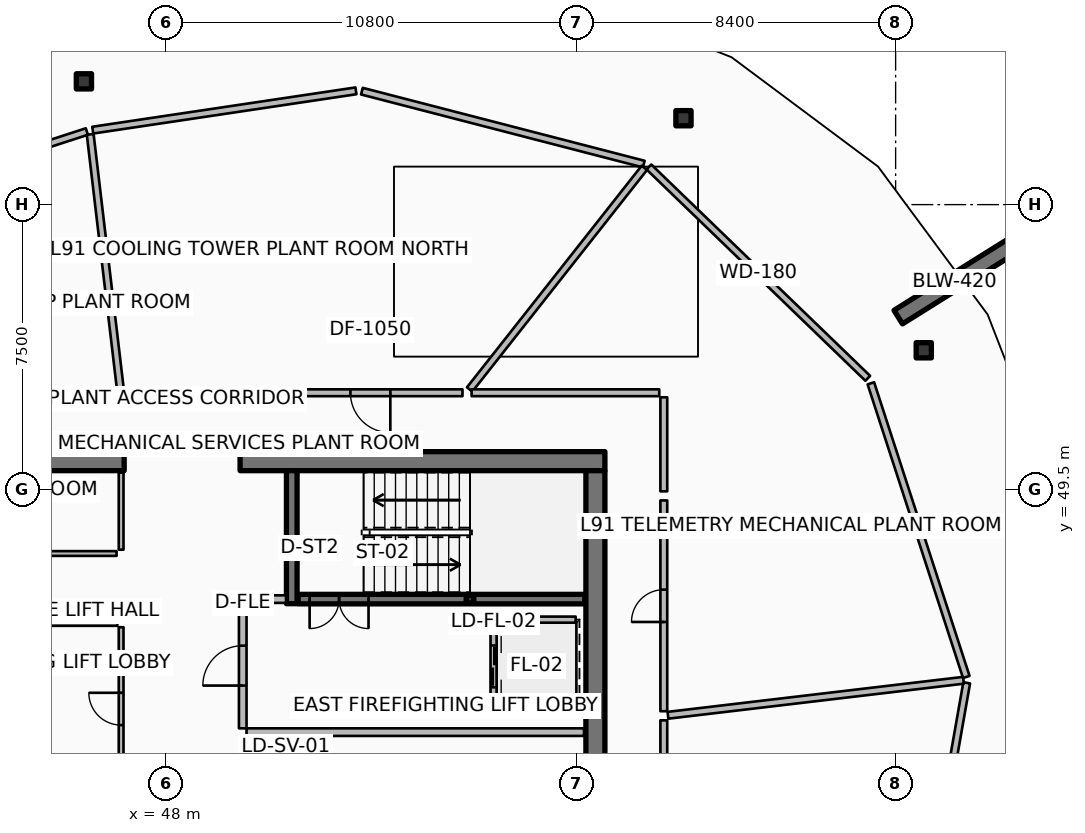
"""IFC4 building model, lengths in metres.
Left out: names, types, materials, properties, quantities, classifications, styles, units other than length and angle.
Written with IfcOpenShell. Run it as: python <this file> out.ifc"""

import sys

from ifc_helpers import new_model, si_unit, direction, frame, frame_2d, origin, origin_2d, place, context, subcontext, project, spatial, rectangle, hollow_rectangle, extrude, element, fill, save


model = new_model("IFC4")
c1 = context("Model", 3, precision=1e-05, world=origin(), true_north=direction((0.0, 1.0)))
c2 = subcontext(c1, "Body", "Model", "MODEL_VIEW")
j1 = project(units=[si_unit("LENGTHUNIT", "METRE"), si_unit("PLANEANGLEUNIT", "RADIAN")], contexts=[c1])
p1 = place(None, origin())
s1 = spatial("IfcSite", under=j1, at=p1, CompositionType="ELEMENT")
p2 = place(p1, origin())
s2 = spatial("IfcBuilding", under=s1, at=p2, CompositionType="ELEMENT")
p3 = place(p2, frame((0.0, 0.0, 363.2)))
s3 = spatial("IfcBuildingStorey", under=s2, at=p3, CompositionType="ELEMENT", Elevation=363.2)
p4 = place(p3, frame((37.3, 50.25, 0.0), z_axis=(0.0, 0.0, 1.0), x_axis=(1.0, 0.0, 0.0)))
e1 = element("IfcWall", 1, at=p4, inside=s3, PredefinedType="SHEAR", context=c2, shape_type="SweptSolid", body=[
    extrude(rectangle(XDim=9.6, YDim=0.5, at=frame_2d((4.8, 0.0))), origin(), (0.0, 0.0, 1.0), 3.6),
])
p5 = place(p3, frame((49.95, 50.25, 0.0), z_axis=(0.0, 0.0, 1.0), x_axis=(1.0, 0.0, 0.0)))
e2 = element("IfcWall", 2, at=p5, inside=s3, PredefinedType="SHEAR", context=c2, shape_type="SweptSolid", body=[
    extrude(rectangle(XDim=9.6, YDim=0.5, at=frame_2d((4.8, 0.0))), origin(), (0.0, 0.0, 1.0), 3.6),
])
p6 = place(p3, frame((59.3, 34.0, 0.0), z_axis=(0.0, 0.0, 1.0), x_axis=(0.0, 1.0, 0.0)))
e3 = element("IfcWall", 3, at=p6, inside=s3, PredefinedType="SHEAR", context=c2, shape_type="SweptSolid", body=[
    extrude(rectangle(XDim=16.0, YDim=0.5, at=frame_2d((8.0, 0.0))), origin(), (0.0, 0.0, 1.0), 3.6),
])
p7 = place(p3, frame((51.31, 46.5, 0.0), z_axis=(0.0, 0.0, 1.0), x_axis=(0.0, 1.0, 0.0)))
e4 = element("IfcWall", 4, at=p7, inside=s3, PredefinedType="SHEAR", context=c2, shape_type="SweptSolid", body=[
    extrude(rectangle(XDim=3.5, YDim=0.28, at=frame_2d((1.75, 0.0))), origin(), (0.0, 0.0, 1.0), 3.6),
])
p8 = place(p3, frame((56.0, 46.62, 0.0), z_axis=(0.0, 0.0, 1.0), x_axis=(1.0, 0.0, 0.0)))
e5 = element("IfcColumn", 5, at=p8, inside=s3, PredefinedType="COLUMN", context=c2, shape_type="SweptSolid", body=[
    extrude(hollow_rectangle(XDim=0.2, YDim=0.2, WallThickness=0.01, InnerFilletRadius=0.01, OuterFilletRadius=0.02, at=origin_2d()), origin(), (0.0, 0.0, 1.0), 1.595),
])
p9 = place(p3, frame((67.269, 54.041, 0.0), z_axis=(0.0, 0.0, 1.0), x_axis=(0.848033572426, 0.529942506352, 0.0)))
e6 = element("IfcWall", 6, at=p9, inside=s3, PredefinedType="SOLIDWALL", context=c2, shape_type="SweptSolid", body=[
    extrude(rectangle(XDim=3.5, YDim=0.42, at=frame_2d((1.75, 0.0))), origin(), (0.0, 0.0, 1.0), 3.6),
])
for number, where, z_axis, x_axis in (
    (7, (67.941, 53.167, 0.0), (0.0, 0.0, 1.0), (1.0, 0.0, 0.0)),
    (8, (61.617, 59.274, 0.0), (0.0, 0.0, 1.0), (1.0, 0.0, 0.0)),
    (9, (45.841, 60.244, 0.0), (0.0, 0.0, 1.0), (1.0, 0.0, 0.0)),
):
    element("IfcColumn", number, at=place(p3, frame(where, z_axis=z_axis, x_axis=x_axis)), inside=s3, PredefinedType="COLUMN", context=c2, shape_type="SweptSolid", body=[
        extrude(hollow_rectangle(XDim=0.4, YDim=0.4, WallThickness=0.02, InnerFilletRadius=0.02, OuterFilletRadius=0.04, at=origin_2d()), origin(), (0.0, 0.0, 1.0), 3.32),
    ])
p10 = place(p3, frame((51.48, 46.62, 0.0), z_axis=(0.0, 0.0, 1.0), x_axis=(1.0, 0.0, 0.0)))
e10 = element("IfcWall", 10, at=p10, inside=s3, PredefinedType="SOLIDWALL", context=c2, shape_type="SweptSolid", body=[
    extrude(rectangle(XDim=7.54, YDim=0.25, at=frame_2d((3.77, 0.0))), origin(), (0.0, 0.0, 1.0), 3.32),
])
p11 = place(p10, frame((0.3, 0.0, 0.0)))
e11 = element("IfcOpeningElement", 11, at=p11, cuts=e10, PredefinedType="OPENING", context=c2, shape_type="SweptSolid", body=[
    extrude(rectangle(XDim=1.55, YDim=2.15, at=frame_2d((0.775, 1.075))), frame((0.0, 0.135, 0.0), z_axis=(0.0, -1.0, 0.0), x_axis=(1.0, 0.0, 0.0)), (0.0, 0.0, 1.0), 0.27),
])
p12 = place(p3, frame((56.62, 46.08, 0.0), z_axis=(0.0, 0.0, 1.0), x_axis=(0.0, -1.0, 0.0)))
e12 = element("IfcWall", 12, at=p12, inside=s3, PredefinedType="PARTITIONING", context=c2, shape_type="SweptSolid", body=[
    extrude(rectangle(XDim=2.46, YDim=0.16, at=frame_2d((1.23, 0.0))), origin(), (0.0, 0.0, 1.0), 3.32),
])
p13 = place(p12, frame((0.68, 0.0, 0.0)))
e13 = element("IfcOpeningElement", 13, at=p13, cuts=e12, PredefinedType="OPENING", context=c2, shape_type="SweptSolid", body=[
    extrude(rectangle(XDim=1.1, YDim=2.1, at=frame_2d((0.55, 1.05))), frame((0.0, 0.09, 0.0), z_axis=(0.0, -1.0, 0.0), x_axis=(1.0, 0.0, 0.0)), (0.0, 0.0, 1.0), 0.18),
])
for number, where, z_axis, x_axis in (
    (14, (56.72, 46.08, 0.0), (0.0, 0.0, 1.0), (1.0, 0.0, 0.0)),
    (15, (56.72, 43.62, 0.0), (0.0, 0.0, 1.0), (1.0, 0.0, 0.0)),
):
    element("IfcWall", number, at=place(p3, frame(where, z_axis=z_axis, x_axis=x_axis)), inside=s3, PredefinedType="PARTITIONING", context=c2, shape_type="SweptSolid", body=[
        extrude(rectangle(XDim=2.06, YDim=0.16, at=frame_2d((1.03, 0.0))), origin(), (0.0, 0.0, 1.0), 3.32),
    ])
for number, where, z_axis, x_axis in (
    (16, (52.23, 40.67, 0.0), (0.0, 0.0, 1.0), (0.0, 1.0, 0.0)),
    (17, (50.07, 40.67, 0.0), (0.0, 0.0, 1.0), (0.0, 1.0, 0.0)),
):
    element("IfcWall", number, at=place(p3, frame(where, z_axis=z_axis, x_axis=x_axis)), inside=s3, PredefinedType="PARTITIONING", context=c2, shape_type="SweptSolid", body=[
        extrude(rectangle(XDim=2.16, YDim=0.16, at=frame_2d((1.08, 0.0))), origin(), (0.0, 0.0, 1.0), 3.32),
    ])
p14 = place(p3, frame((50.17, 42.93, 0.0), z_axis=(0.0, 0.0, 1.0), x_axis=(1.0, 0.0, 0.0)))
e18 = element("IfcWall", 18, at=p14, inside=s3, PredefinedType="PARTITIONING", context=c2, shape_type="SweptSolid", body=[
    extrude(rectangle(XDim=1.96, YDim=0.16, at=frame_2d((0.98, 0.0))), origin(), (0.0, 0.0, 1.0), 3.32),
])
p15 = place(p3, frame((46.82, 47.92, 0.0), z_axis=(0.0, 0.0, 1.0), x_axis=(0.0, 1.0, 0.0)))
e19 = element("IfcWall", 19, at=p15, inside=s3, PredefinedType="PARTITIONING", context=c2, shape_type="SweptSolid", body=[
    extrude(rectangle(XDim=2.03, YDim=0.125, at=frame_2d((1.015, 0.0))), origin(), (0.0, 0.0, 1.0), 2.76),
])
p16 = place(p3, frame((37.92, 47.82, 0.0), z_axis=(0.0, 0.0, 1.0), x_axis=(1.0, 0.0, 0.0)))
e20 = element("IfcWall", 20, at=p16, inside=s3, PredefinedType="PARTITIONING", context=c2, shape_type="SweptSolid", body=[
    extrude(rectangle(XDim=8.78, YDim=0.125, at=frame_2d((4.39, 0.0))), origin(), (0.0, 0.0, 1.0), 2.76),
])
p17 = place(p16, frame((3.965, 0.0, 0.0)))
e21 = element("IfcOpeningElement", 21, at=p17, cuts=e20, PredefinedType="OPENING", context=c2, shape_type="SweptSolid", body=[
    extrude(rectangle(XDim=0.85, YDim=2.06, at=frame_2d((0.425, 1.03))), frame((0.0, 0.073, 0.0), z_axis=(0.0, -1.0, 0.0), x_axis=(1.0, 0.0, 0.0)), (0.0, 0.0, 1.0), 0.145),
])
p18 = place(p3, frame((50.12, 43.12, 0.0), z_axis=(0.0, 0.0, 1.0), x_axis=(1.0, 0.0, 0.0)))
e22 = element("IfcWall", 22, at=p18, inside=s3, PredefinedType="PARTITIONING", context=c2, shape_type="SweptSolid", body=[
    extrude(rectangle(XDim=8.88, YDim=0.2, at=frame_2d((4.44, 0.0))), origin(), (0.0, 0.0, 1.0), 3.32),
])
p19 = place(p3, frame((50.14, 46.62, 0.0), z_axis=(0.0, 0.0, 1.0), x_axis=(1.0, 0.0, 0.0)))
e23 = element("IfcWall", 23, at=p19, inside=s3, PredefinedType="PARTITIONING", context=c2, shape_type="SweptSolid", body=[
    extrude(rectangle(XDim=1.02, YDim=0.2, at=frame_2d((0.51, 0.0))), origin(), (0.0, 0.0, 1.0), 3.32),
])
p20 = place(p3, frame((50.02, 43.22, 0.0), z_axis=(0.0, 0.0, 1.0), x_axis=(0.0, 1.0, 0.0)))
e24 = element("IfcWall", 24, at=p20, inside=s3, PredefinedType="PARTITIONING", context=c2, shape_type="SweptSolid", body=[
    extrude(rectangle(XDim=3.3, YDim=0.2, at=frame_2d((1.65, 0.0))), origin(), (0.0, 0.0, 1.0), 3.32),
])
p21 = place(p20, frame((1.125, 0.0, 0.0)))
e25 = element("IfcOpeningElement", 25, at=p21, cuts=e24, PredefinedType="OPENING", context=c2, shape_type="SweptSolid", body=[
    extrude(rectangle(XDim=1.05, YDim=2.1, at=frame_2d((0.525, 1.05))), frame((0.0, 0.11, 0.0), z_axis=(0.0, -1.0, 0.0), x_axis=(1.0, 0.0, 0.0)), (0.0, 0.0, 1.0), 0.22),
])
p22 = place(p3, frame((41.36, 45.98, 0.0), z_axis=(0.0, 0.0, 1.0), x_axis=(1.0, 0.0, 0.0)))
e26 = element("IfcWall", 26, at=p22, inside=s3, PredefinedType="PARTITIONING", context=c2, shape_type="SweptSolid", body=[
    extrude(rectangle(XDim=5.36, YDim=0.125, at=frame_2d((2.68, 0.0))), origin(), (0.0, 0.0, 1.0), 2.76),
])
p23 = place(p3, frame((46.82, 41.58, 0.0), z_axis=(0.0, 0.0, 1.0), x_axis=(0.0, 1.0, 0.0)))
e27 = element("IfcWall", 27, at=p23, inside=s3, PredefinedType="PARTITIONING", context=c2, shape_type="SweptSolid", body=[
    extrude(rectangle(XDim=4.3, YDim=0.125, at=frame_2d((2.15, 0.0))), origin(), (0.0, 0.0, 1.0), 2.76),
])
p24 = place(p23, frame((1.725, 0.0, 0.0)))
e28 = element("IfcOpeningElement", 28, at=p24, cuts=e27, PredefinedType="OPENING", context=c2, shape_type="SweptSolid", body=[
    extrude(rectangle(XDim=0.85, YDim=2.06, at=frame_2d((0.425, 1.03))), frame((0.0, 0.073, 0.0), z_axis=(0.0, -1.0, 0.0), x_axis=(1.0, 0.0, 0.0)), (0.0, 0.0, 1.0), 0.145),
])
p25 = place(p3, frame((66.467, 52.43, 0.0), z_axis=(0.0, 0.0, 1.0), x_axis=(-0.719364153135, 0.694633151516, 0.0)))
e29 = element("IfcWall", 29, at=p25, inside=s3, PredefinedType="PARTITIONING", context=c2, shape_type="SweptSolid", body=[
    extrude(rectangle(XDim=8.006, YDim=0.18, at=frame_2d((4.003, 0.0))), origin(), (0.0, 0.0, 1.0), 2.76),
])
p26 = place(p3, frame((60.573, 58.066, 0.0), z_axis=(0.0, 0.0, 1.0), x_axis=(-0.968117205342, 0.250497658115, 0.0)))
e30 = element("IfcWall", 30, at=p26, inside=s3, PredefinedType="PARTITIONING", context=c2, shape_type="SweptSolid", body=[
    extrude(rectangle(XDim=7.662, YDim=0.18, at=frame_2d((3.831, 0.0))), origin(), (0.0, 0.0, 1.0), 2.76),
])
p27 = place(p3, frame((52.999, 59.994, 0.0), z_axis=(0.0, 0.0, 1.0), x_axis=(-0.989034336252, -0.147685753256, 0.0)))
e31 = element("IfcWall", 31, at=p27, inside=s3, PredefinedType="PARTITIONING", context=c2, shape_type="SweptSolid", body=[
    extrude(rectangle(XDim=7.003, YDim=0.18, at=frame_2d((3.501, 0.0))), origin(), (0.0, 0.0, 1.0), 2.76),
])
p28 = place(p3, frame((45.918, 58.923, 0.0), z_axis=(0.0, 0.0, 1.0), x_axis=(-0.95105283999, -0.309028308649, 0.0)))
e32 = element("IfcWall", 32, at=p28, inside=s3, PredefinedType="PARTITIONING", context=c2, shape_type="SweptSolid", body=[
    extrude(rectangle(XDim=6.499, YDim=0.18, at=frame_2d((3.25, 0.0))), origin(), (0.0, 0.0, 1.0), 2.76),
])
p29 = place(p3, frame((67.68, 36.532, 0.0), z_axis=(0.0, 0.0, 1.0), x_axis=(0.173668776466, 0.984804120666, 0.0)))
e33 = element("IfcWall", 33, at=p29, inside=s3, PredefinedType="PARTITIONING", context=c2, shape_type="SweptSolid", body=[
    extrude(rectangle(XDim=8.006, YDim=0.18, at=frame_2d((4.003, 0.0))), origin(), (0.0, 0.0, 1.0), 2.76),
])
p30 = place(p3, frame((69.059, 44.572, 0.0), z_axis=(0.0, 0.0, 1.0), x_axis=(-0.309024234991, 0.951054163646, 0.0)))
e34 = element("IfcWall", 34, at=p30, inside=s3, PredefinedType="PARTITIONING", context=c2, shape_type="SweptSolid", body=[
    extrude(rectangle(XDim=8.124, YDim=0.18, at=frame_2d((4.062, 0.0))), origin(), (0.0, 0.0, 1.0), 2.76),
])
p31 = place(p3, frame((55.803, 52.05, 0.0), z_axis=(0.0, 0.0, 1.0), x_axis=(-1.0, 0.0, 0.0)))
e35 = element("IfcWall", 35, at=p31, inside=s3, PredefinedType="PARTITIONING", context=c2, shape_type="SweptSolid", body=[
    extrude(rectangle(XDim=4.848, YDim=0.18, at=frame_2d((2.424, 0.0))), origin(), (0.0, 0.0, 1.0), 2.76),
])
p32 = place(p31, frame((1.899, 0.0, 0.0)))
e36 = element("IfcOpeningElement", 36, at=p32, cuts=e35, PredefinedType="OPENING", context=c2, shape_type="SweptSolid", body=[
    extrude(rectangle(XDim=1.05, YDim=2.1, at=frame_2d((0.525, 1.05))), frame((0.0, 0.1, 0.0), z_axis=(0.0, -1.0, 0.0), x_axis=(1.0, 0.0, 0.0)), (0.0, 0.0, 1.0), 0.2),
])
p33 = place(p3, frame((50.714, 52.05, 0.0), z_axis=(0.0, 0.0, 1.0), x_axis=(-1.0, 0.0, 0.0)))
e37 = element("IfcWall", 37, at=p33, inside=s3, PredefinedType="PARTITIONING", context=c2, shape_type="SweptSolid", body=[
    extrude(rectangle(XDim=3.784, YDim=0.18, at=frame_2d((1.892, 0.0))), origin(), (0.0, 0.0, 1.0), 2.76),
])
p34 = place(p3, frame((55.991, 52.136, 0.0), z_axis=(0.0, 0.0, 1.0), x_axis=(0.619089811342, 0.785320192974, 0.0)))
e38 = element("IfcWall", 38, at=p34, inside=s3, PredefinedType="PARTITIONING", context=c2, shape_type="SweptSolid", body=[
    extrude(rectangle(XDim=7.426, YDim=0.18, at=frame_2d((3.713, 0.0))), origin(), (0.0, 0.0, 1.0), 2.76),
])
p35 = place(p3, frame((46.798, 52.159, 0.0), z_axis=(0.0, 0.0, 1.0), x_axis=(-0.117541495417, 0.993067971921, 0.0)))
e39 = element("IfcWall", 39, at=p35, inside=s3, PredefinedType="PARTITIONING", context=c2, shape_type="SweptSolid", body=[
    extrude(rectangle(XDim=6.736, YDim=0.18, at=frame_2d((3.368, 0.0))), origin(), (0.0, 0.0, 1.0), 2.76),
])
p36 = place(p3, frame((46.69, 52.05, 0.0), z_axis=(0.0, 0.0, 1.0), x_axis=(-1.0, 0.0, 0.0)))
e40 = element("IfcWall", 40, at=p36, inside=s3, PredefinedType="PARTITIONING", context=c2, shape_type="SweptSolid", body=[
    extrude(rectangle(XDim=4.199, YDim=0.18, at=frame_2d((2.099, 0.0))), origin(), (0.0, 0.0, 1.0), 2.76),
])
p37 = place(p3, frame((61.1, 38.425, 0.0), z_axis=(0.0, 0.0, 1.0), x_axis=(0.0, 1.0, 0.0)))
e41 = element("IfcWall", 41, at=p37, inside=s3, PredefinedType="PARTITIONING", context=c2, shape_type="SweptSolid", body=[
    extrude(rectangle(XDim=5.005, YDim=0.18, at=frame_2d((2.502, 0.0))), origin(), (0.0, 0.0, 1.0), 2.76),
])
p38 = place(p3, frame((61.209, 43.563, 0.0), z_axis=(0.0, 0.0, 1.0), x_axis=(0.993070558818, 0.117519637545, 0.0)))
e42 = element("IfcWall", 42, at=p38, inside=s3, PredefinedType="PARTITIONING", context=c2, shape_type="SweptSolid", body=[
    extrude(rectangle(XDim=7.83, YDim=0.18, at=frame_2d((3.915, 0.0))), origin(), (0.0, 0.0, 1.0), 2.76),
])
p39 = place(p3, frame((61.1, 43.67, 0.0), z_axis=(0.0, 0.0, 1.0), x_axis=(0.0, 1.0, 0.0)))
e43 = element("IfcWall", 43, at=p39, inside=s3, PredefinedType="PARTITIONING", context=c2, shape_type="SweptSolid", body=[
    extrude(rectangle(XDim=5.546, YDim=0.18, at=frame_2d((2.773, 0.0))), origin(), (0.0, 0.0, 1.0), 2.76),
])
p40 = place(p39, frame((2.348, 0.0, 0.0)))
e44 = element("IfcOpeningElement", 44, at=p40, cuts=e43, PredefinedType="OPENING", context=c2, shape_type="SweptSolid", body=[
    extrude(rectangle(XDim=0.85, YDim=2.06, at=frame_2d((0.425, 1.03))), frame((0.0, 0.1, 0.0), z_axis=(0.0, -1.0, 0.0), x_axis=(1.0, 0.0, 0.0)), (0.0, 0.0, 1.0), 0.2),
])
p41 = place(p3, frame((61.1, 49.456, 0.0), z_axis=(0.0, 0.0, 1.0), x_axis=(0.0, 1.0, 0.0)))
e45 = element("IfcWall", 45, at=p41, inside=s3, PredefinedType="PARTITIONING", context=c2, shape_type="SweptSolid", body=[
    extrude(rectangle(XDim=2.474, YDim=0.18, at=frame_2d((1.237, 0.0))), origin(), (0.0, 0.0, 1.0), 2.76),
])
p42 = place(p3, frame((60.98, 52.05, 0.0), z_axis=(0.0, 0.0, 1.0), x_axis=(-1.0, 0.0, 0.0)))
e46 = element("IfcWall", 46, at=p42, inside=s3, PredefinedType="PARTITIONING", context=c2, shape_type="SweptSolid", body=[
    extrude(rectangle(XDim=4.937, YDim=0.18, at=frame_2d((2.469, 0.0))), origin(), (0.0, 0.0, 1.0), 2.76),
])
p43 = place(p11, origin())
e47 = element("IfcDoor", 47, at=p43, inside=s3, OperationType="DOUBLE_DOOR_SINGLE_SWING", PredefinedType="DOOR", context=c2, shape_type="SweptSolid", body=[
    extrude(rectangle(XDim=1.55, YDim=2.15, at=frame_2d((0.775, 1.075))), frame((0.0, 0.025, 0.0), z_axis=(0.0, -1.0, 0.0), x_axis=(1.0, 0.0, 0.0)), (0.0, 0.0, 1.0), 0.05),
])
fill(e11, e47)
p44 = place(p13, origin())
e48 = element("IfcDoor", 48, at=p44, inside=s3, OperationType="DOUBLE_DOOR_SLIDING", PredefinedType="DOOR", context=c2, shape_type="SweptSolid", body=[
    extrude(rectangle(XDim=1.1, YDim=2.1, at=frame_2d((0.55, 1.05))), frame((0.0, 0.025, 0.0), z_axis=(0.0, -1.0, 0.0), x_axis=(1.0, 0.0, 0.0)), (0.0, 0.0, 1.0), 0.05),
])
fill(e13, e48)
p45 = place(p21, origin())
e49 = element("IfcDoor", 49, at=p45, inside=s3, OperationType="SINGLE_SWING_LEFT", PredefinedType="DOOR", context=c2, shape_type="SweptSolid", body=[
    extrude(rectangle(XDim=1.05, YDim=2.1, at=frame_2d((0.525, 1.05))), frame((0.0, 0.025, 0.0), z_axis=(0.0, -1.0, 0.0), x_axis=(1.0, 0.0, 0.0)), (0.0, 0.0, 1.0), 0.05),
])
fill(e25, e49)
p46 = place(p24, origin())
e50 = element("IfcDoor", 50, at=p46, inside=s3, OperationType="SINGLE_SWING_RIGHT", PredefinedType="DOOR", context=c2, shape_type="SweptSolid", body=[
    extrude(rectangle(XDim=0.85, YDim=2.06, at=frame_2d((0.425, 1.03))), frame((0.0, 0.025, 0.0), z_axis=(0.0, -1.0, 0.0), x_axis=(1.0, 0.0, 0.0)), (0.0, 0.0, 1.0), 0.05),
])
fill(e28, e50)
p47 = place(p32, origin())
e51 = element("IfcDoor", 51, at=p47, inside=s3, OperationType="SINGLE_SWING_LEFT", PredefinedType="DOOR", context=c2, shape_type="SweptSolid", body=[
    extrude(rectangle(XDim=1.05, YDim=2.1, at=frame_2d((0.525, 1.05))), frame((0.0, 0.025, 0.0), z_axis=(0.0, -1.0, 0.0), x_axis=(1.0, 0.0, 0.0)), (0.0, 0.0, 1.0), 0.05),
])
fill(e36, e51)
p48 = place(p40, origin())
e52 = element("IfcDoor", 52, at=p48, inside=s3, OperationType="SINGLE_SWING_LEFT", PredefinedType="DOOR", context=c2, shape_type="SweptSolid", body=[
    extrude(rectangle(XDim=0.85, YDim=2.06, at=frame_2d((0.425, 1.03))), frame((0.0, 0.025, 0.0), z_axis=(0.0, -1.0, 0.0), x_axis=(1.0, 0.0, 0.0)), (0.0, 0.0, 1.0), 0.05),
])
fill(e44, e52)
save(model, sys.argv[1])
